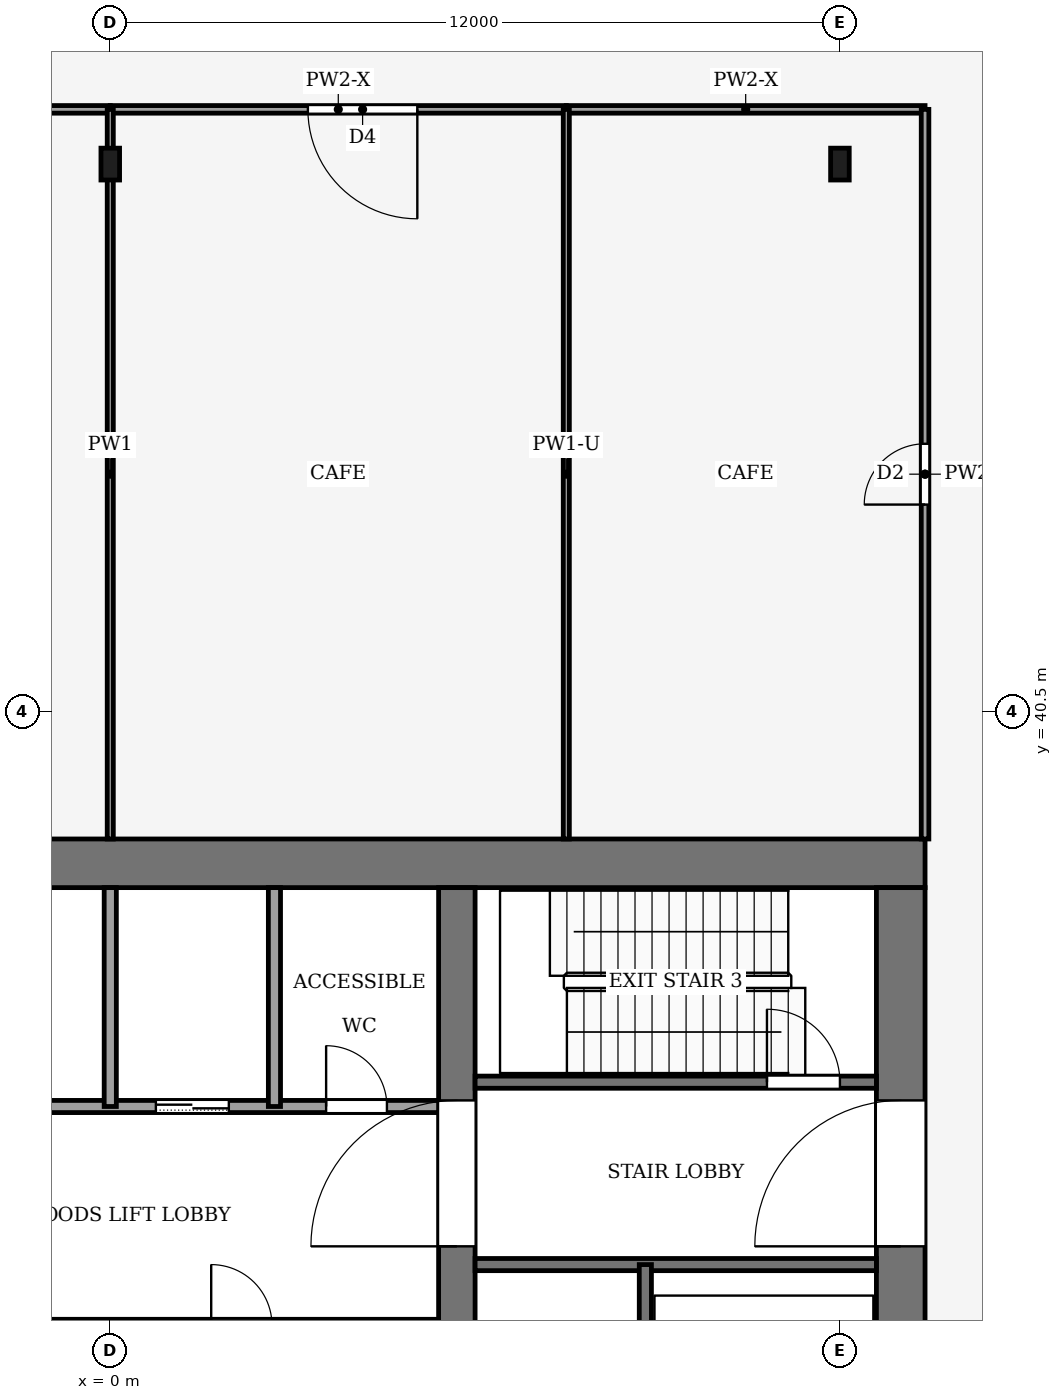
"""IFC4 building model, lengths in metres.
Left out: names, types, materials, properties, quantities, classifications, styles, units other than length and angle.
Written with IfcOpenShell. Run it as: python <this file> out.ifc"""

import sys

from ifc_helpers import new_model, si_unit, direction, frame, frame_2d, origin, origin_2d, place, context, subcontext, project, spatial, rectangle, i_section, extrude, element, fill, save


model = new_model("IFC4")
c1 = context("Model", 3, precision=1e-05, world=origin(), true_north=direction((0.0, 1.0)))
c2 = subcontext(c1, "Body", "Model", "MODEL_VIEW")
j1 = project(units=[si_unit("LENGTHUNIT", "METRE"), si_unit("PLANEANGLEUNIT", "RADIAN")], contexts=[c1])
p1 = place(None, origin())
s1 = spatial("IfcSite", under=j1, at=p1, CompositionType="ELEMENT")
p2 = place(p1, origin())
s2 = spatial("IfcBuilding", under=s1, at=p2, CompositionType="ELEMENT")
p3 = place(p2, frame((0.0, 0.0, 233.0)))
s3 = spatial("IfcBuildingStorey", under=s2, at=p3, CompositionType="ELEMENT", Elevation=233.0)
p4 = place(p3, frame((-13.4, 38.0, -0.13), z_axis=(0.0, 0.0, 1.0), x_axis=(1.0, 0.0, 0.0)))
e1 = element("IfcWall", 1, at=p4, inside=s3, PredefinedType="SHEAR", context=c2, shape_type="SweptSolid", body=[
    extrude(rectangle(XDim=26.8, YDim=0.8, at=frame_2d((13.4, 0.0))), origin(), (0.0, 0.0, 1.0), 5.0),
])
p5 = place(p3, frame((13.0, 18.4, -0.13), z_axis=(0.0, 0.0, 1.0), x_axis=(0.0, 1.0, 0.0)))
e2 = element("IfcWall", 2, at=p5, inside=s3, PredefinedType="SHEAR", context=c2, shape_type="SweptSolid", body=[
    extrude(rectangle(XDim=19.2, YDim=0.8, at=frame_2d((9.6, 0.0))), origin(), (0.0, 0.0, 1.0), 5.0),
])
p6 = place(p5, frame((2.8, 0.0, 0.13)))
e3 = element("IfcOpeningElement", 3, at=p6, cuts=e2, PredefinedType="OPENING", context=c2, shape_type="SweptSolid", body=[
    extrude(rectangle(XDim=2.4, YDim=2.4, at=frame_2d((1.2, 1.2))), frame((0.0, 0.41, 0.0), z_axis=(0.0, -1.0, 0.0), x_axis=(1.0, 0.0, 0.0)), (0.0, 0.0, 1.0), 0.82),
])
p7 = place(p5, frame((13.3, 0.0, 0.13)))
e4 = element("IfcOpeningElement", 4, at=p7, cuts=e2, PredefinedType="OPENING", context=c2, shape_type="SweptSolid", body=[
    extrude(rectangle(XDim=2.4, YDim=2.4, at=frame_2d((1.2, 1.2))), frame((0.0, 0.41, 0.0), z_axis=(0.0, -1.0, 0.0), x_axis=(1.0, 0.0, 0.0)), (0.0, 0.0, 1.0), 0.82),
])
p8 = place(p3, frame((5.7, 18.4, -0.13), z_axis=(0.0, 0.0, 1.0), x_axis=(0.0, 1.0, 0.0)))
e5 = element("IfcWall", 5, at=p8, inside=s3, PredefinedType="SHEAR", context=c2, shape_type="SweptSolid", body=[
    extrude(rectangle(XDim=19.2, YDim=0.6, at=frame_2d((9.6, 0.0))), origin(), (0.0, 0.0, 1.0), 5.0),
])
p9 = place(p8, frame((13.3, 0.0, 0.13)))
e6 = element("IfcOpeningElement", 6, at=p9, cuts=e5, PredefinedType="OPENING", context=c2, shape_type="SweptSolid", body=[
    extrude(rectangle(XDim=2.4, YDim=2.4, at=frame_2d((1.2, 1.2))), frame((0.0, 0.31, 0.0), z_axis=(0.0, -1.0, 0.0), x_axis=(1.0, 0.0, 0.0)), (0.0, 0.0, 1.0), 0.62),
])
for number, where, z_axis, x_axis in (
    (7, (0.0, 49.5, 0.0), (0.0, 0.0, 1.0), (1.0, 0.0, 0.0)),
    (8, (12.0, 49.5, 0.0), (0.0, 0.0, 1.0), (1.0, 0.0, 0.0)),
):
    element("IfcColumn", number, at=place(p3, frame(where, z_axis=z_axis, x_axis=x_axis)), inside=s3, PredefinedType="COLUMN", context=c2, shape_type="SweptSolid", body=[
        extrude(i_section(OverallWidth=0.306, OverallDepth=0.524, WebThickness=0.012, FlangeThickness=0.04, FilletRadius=0.027, at=origin_2d()), origin(), (0.0, 0.0, 1.0), 5.0),
    ])
p10 = place(p3, frame((6.0, 31.4, 0.0), z_axis=(0.0, 0.0, 1.0), x_axis=(1.0, 0.0, 0.0)))
e9 = element("IfcWall", 9, at=p10, inside=s3, PredefinedType="PARTITIONING", context=c2, shape_type="SweptSolid", body=[
    extrude(rectangle(XDim=6.6, YDim=0.2, at=frame_2d((3.3, 0.0))), origin(), (0.0, 0.0, 1.0), 4.87),
])
p11 = place(p3, frame((-5.4, 34.0, 0.0), z_axis=(0.0, 0.0, 1.0), x_axis=(1.0, 0.0, 0.0)))
e10 = element("IfcWall", 10, at=p11, inside=s3, PredefinedType="PARTITIONING", context=c2, shape_type="SweptSolid", body=[
    extrude(rectangle(XDim=10.8, YDim=0.2, at=frame_2d((5.4, 0.0))), origin(), (0.0, 0.0, 1.0), 4.87),
])
p12 = place(p11, frame((6.15, 0.0, 0.0)))
e11 = element("IfcOpeningElement", 11, at=p12, cuts=e10, PredefinedType="OPENING", context=c2, shape_type="SweptSolid", body=[
    extrude(rectangle(XDim=1.2, YDim=2.2, at=frame_2d((0.6, 1.1))), frame((0.0, 0.11, 0.0), z_axis=(0.0, -1.0, 0.0), x_axis=(1.0, 0.0, 0.0)), (0.0, 0.0, 1.0), 0.22),
])
p13 = place(p11, frame((8.95, 0.0, 0.0)))
e12 = element("IfcOpeningElement", 12, at=p13, cuts=e10, PredefinedType="OPENING", context=c2, shape_type="SweptSolid", body=[
    extrude(rectangle(XDim=1.0, YDim=2.1, at=frame_2d((0.5, 1.05))), frame((0.0, 0.11, 0.0), z_axis=(0.0, -1.0, 0.0), x_axis=(1.0, 0.0, 0.0)), (0.0, 0.0, 1.0), 0.22),
])
p14 = place(p3, frame((6.0, 34.4, 0.0), z_axis=(0.0, 0.0, 1.0), x_axis=(1.0, 0.0, 0.0)))
e13 = element("IfcWall", 13, at=p14, inside=s3, PredefinedType="PARTITIONING", context=c2, shape_type="SweptSolid", body=[
    extrude(rectangle(XDim=6.6, YDim=0.2, at=frame_2d((3.3, 0.0))), origin(), (0.0, 0.0, 1.0), 4.87),
])
p15 = place(p14, frame((4.8, 0.0, 0.0)))
e14 = element("IfcOpeningElement", 14, at=p15, cuts=e13, PredefinedType="OPENING", context=c2, shape_type="SweptSolid", body=[
    extrude(rectangle(XDim=1.2, YDim=2.2, at=frame_2d((0.6, 1.1))), frame((0.0, 0.11, 0.0), z_axis=(0.0, -1.0, 0.0), x_axis=(1.0, 0.0, 0.0)), (0.0, 0.0, 1.0), 0.22),
])
for number, where, z_axis, x_axis in (
    (15, (0.0, 34.0, 0.0), (0.0, 0.0, 1.0), (0.0, 1.0, 0.0)),
    (16, (2.7, 34.0, 0.0), (0.0, 0.0, 1.0), (0.0, 1.0, 0.0)),
):
    element("IfcWall", number, at=place(p3, frame(where, z_axis=z_axis, x_axis=x_axis)), inside=s3, PredefinedType="PARTITIONING", context=c2, shape_type="SweptSolid", body=[
        extrude(rectangle(XDim=3.6, YDim=0.2, at=frame_2d((1.8, 0.0))), origin(), (0.0, 0.0, 1.0), 4.87),
    ])
p16 = place(p3, frame((8.8, 24.0, 0.0), z_axis=(0.0, 0.0, 1.0), x_axis=(0.0, 1.0, 0.0)))
e17 = element("IfcWall", 17, at=p16, inside=s3, PredefinedType="PARTITIONING", context=c2, shape_type="SweptSolid", body=[
    extrude(rectangle(XDim=7.4, YDim=0.2, at=frame_2d((3.7, 0.0))), origin(), (0.0, 0.0, 1.0), 4.87),
])
p17 = place(p3, frame((0.0, 50.4, 0.0), z_axis=(0.0, 0.0, 1.0), x_axis=(-1.0, 0.0, 0.0)))
e18 = element("IfcWall", 18, at=p17, inside=s3, PredefinedType="PARTITIONING", context=c2, shape_type="SweptSolid", body=[
    extrude(rectangle(XDim=7.5, YDim=0.125, at=frame_2d((3.75, 0.0))), origin(), (0.0, 0.0, 1.0), 4.24),
])
p18 = place(p17, frame((3.65, 0.0, 0.0)))
e19 = element("IfcOpeningElement", 19, at=p18, cuts=e18, PredefinedType="OPENING", context=c2, shape_type="SweptSolid", body=[
    extrude(rectangle(XDim=1.0, YDim=2.1, at=frame_2d((0.5, 1.05))), frame((0.0, 0.073, 0.0), z_axis=(0.0, -1.0, 0.0), x_axis=(1.0, 0.0, 0.0)), (0.0, 0.0, 1.0), 0.145),
])
p19 = place(p3, frame((13.4, 50.4, 0.0), z_axis=(0.0, 0.0, 1.0), x_axis=(-1.0, 0.0, 0.0)))
e20 = element("IfcWall", 20, at=p19, inside=s3, PredefinedType="PARTITIONING", context=c2, shape_type="SweptSolid", body=[
    extrude(rectangle(XDim=5.9, YDim=0.125, at=frame_2d((2.95, 0.0))), origin(), (0.0, 0.0, 1.0), 4.24),
])
p20 = place(p3, frame((13.4, 38.4, 0.0), z_axis=(0.0, 0.0, 1.0), x_axis=(0.0, 1.0, 0.0)))
e21 = element("IfcWall", 21, at=p20, inside=s3, PredefinedType="PARTITIONING", context=c2, shape_type="SweptSolid", body=[
    extrude(rectangle(XDim=12.0, YDim=0.125, at=frame_2d((6.0, 0.0))), origin(), (0.0, 0.0, 1.0), 4.14),
])
p21 = place(p20, frame((5.5, 0.0, 0.0)))
e22 = element("IfcOpeningElement", 22, at=p21, cuts=e21, PredefinedType="OPENING", context=c2, shape_type="SweptSolid", body=[
    extrude(rectangle(XDim=1.0, YDim=2.1, at=frame_2d((0.5, 1.05))), frame((0.0, 0.073, 0.0), z_axis=(0.0, -1.0, 0.0), x_axis=(1.0, 0.0, 0.0)), (0.0, 0.0, 1.0), 0.145),
])
p22 = place(p3, frame((7.5, 50.4, 0.0), z_axis=(0.0, 0.0, 1.0), x_axis=(-1.0, 0.0, 0.0)))
e23 = element("IfcWall", 23, at=p22, inside=s3, PredefinedType="PARTITIONING", context=c2, shape_type="SweptSolid", body=[
    extrude(rectangle(XDim=7.5, YDim=0.125, at=frame_2d((3.75, 0.0))), origin(), (0.0, 0.0, 1.0), 4.24),
])
p23 = place(p22, frame((2.45, 0.0, 0.0)))
e24 = element("IfcOpeningElement", 24, at=p23, cuts=e23, PredefinedType="OPENING", context=c2, shape_type="SweptSolid", body=[
    extrude(rectangle(XDim=1.8, YDim=2.1, at=frame_2d((0.9, 1.05))), frame((0.0, 0.073, 0.0), z_axis=(0.0, -1.0, 0.0), x_axis=(1.0, 0.0, 0.0)), (0.0, 0.0, 1.0), 0.145),
])
p24 = place(p3, frame((0.0, 38.4, 0.0), z_axis=(0.0, 0.0, 1.0), x_axis=(0.0, 1.0, 0.0)))
e25 = element("IfcWall", 25, at=p24, inside=s3, PredefinedType="PARTITIONING", context=c2, shape_type="SweptSolid", body=[
    extrude(rectangle(XDim=12.0, YDim=0.1, at=frame_2d((6.0, 0.0))), origin(), (0.0, 0.0, 1.0), 4.29),
])
p25 = place(p3, frame((7.5, 50.4, 0.0), z_axis=(0.0, 0.0, 1.0), x_axis=(0.0, -1.0, 0.0)))
e26 = element("IfcWall", 26, at=p25, inside=s3, PredefinedType="PARTITIONING", context=c2, shape_type="SweptSolid", body=[
    extrude(rectangle(XDim=12.0, YDim=0.1, at=frame_2d((6.0, 0.0))), origin(), (0.0, 0.0, 1.0), 4.24),
])
p26 = place(p12, origin())
e27 = element("IfcDoor", 27, at=p26, inside=s3, OperationType="SLIDING_TO_LEFT", PredefinedType="DOOR", context=c2, shape_type="SweptSolid", body=[
    extrude(rectangle(XDim=1.2, YDim=2.2, at=frame_2d((0.6, 1.1))), frame((0.0, 0.025, 0.0), z_axis=(0.0, -1.0, 0.0), x_axis=(1.0, 0.0, 0.0)), (0.0, 0.0, 1.0), 0.05),
])
fill(e11, e27)
p27 = place(p13, origin())
e28 = element("IfcDoor", 28, at=p27, inside=s3, OperationType="SINGLE_SWING_LEFT", PredefinedType="DOOR", context=c2, shape_type="SweptSolid", body=[
    extrude(rectangle(XDim=1.0, YDim=2.1, at=frame_2d((0.5, 1.05))), frame((0.0, 0.025, 0.0), z_axis=(0.0, -1.0, 0.0), x_axis=(1.0, 0.0, 0.0)), (0.0, 0.0, 1.0), 0.05),
])
fill(e12, e28)
p28 = place(p15, origin())
e29 = element("IfcDoor", 29, at=p28, inside=s3, OperationType="SINGLE_SWING_RIGHT", PredefinedType="DOOR", context=c2, shape_type="SweptSolid", body=[
    extrude(rectangle(XDim=1.2, YDim=2.2, at=frame_2d((0.6, 1.1))), frame((0.0, 0.025, 0.0), z_axis=(0.0, -1.0, 0.0), x_axis=(1.0, 0.0, 0.0)), (0.0, 0.0, 1.0), 0.05),
])
fill(e14, e29)
p29 = place(p9, origin())
e30 = element("IfcDoor", 30, at=p29, inside=s3, OperationType="DOUBLE_DOOR_SINGLE_SWING", PredefinedType="DOOR", context=c2, shape_type="SweptSolid", body=[
    extrude(rectangle(XDim=2.4, YDim=2.4, at=frame_2d((1.2, 1.2))), frame((0.0, 0.025, 0.0), z_axis=(0.0, -1.0, 0.0), x_axis=(1.0, 0.0, 0.0)), (0.0, 0.0, 1.0), 0.05),
])
fill(e6, e30)
p30 = place(p7, origin())
e31 = element("IfcDoor", 31, at=p30, inside=s3, OperationType="DOUBLE_DOOR_SINGLE_SWING", PredefinedType="DOOR", context=c2, shape_type="SweptSolid", body=[
    extrude(rectangle(XDim=2.4, YDim=2.4, at=frame_2d((1.2, 1.2))), frame((0.0, 0.025, 0.0), z_axis=(0.0, -1.0, 0.0), x_axis=(1.0, 0.0, 0.0)), (0.0, 0.0, 1.0), 0.05),
])
fill(e4, e31)
p31 = place(p21, origin())
e32 = element("IfcDoor", 32, at=p31, inside=s3, OperationType="SINGLE_SWING_LEFT", PredefinedType="DOOR", context=c2, shape_type="SweptSolid", body=[
    extrude(rectangle(XDim=1.0, YDim=2.1, at=frame_2d((0.5, 1.05))), frame((0.0, 0.025, 0.0), z_axis=(0.0, -1.0, 0.0), x_axis=(1.0, 0.0, 0.0)), (0.0, 0.0, 1.0), 0.05),
])
fill(e22, e32)
p32 = place(p23, origin())
e33 = element("IfcDoor", 33, at=p32, inside=s3, OperationType="DOUBLE_DOOR_SINGLE_SWING", PredefinedType="DOOR", context=c2, shape_type="SweptSolid", body=[
    extrude(rectangle(XDim=1.8, YDim=2.1, at=frame_2d((0.9, 1.05))), frame((0.0, 0.025, 0.0), z_axis=(0.0, -1.0, 0.0), x_axis=(1.0, 0.0, 0.0)), (0.0, 0.0, 1.0), 0.05),
])
fill(e24, e33)
save(model, sys.argv[1])
